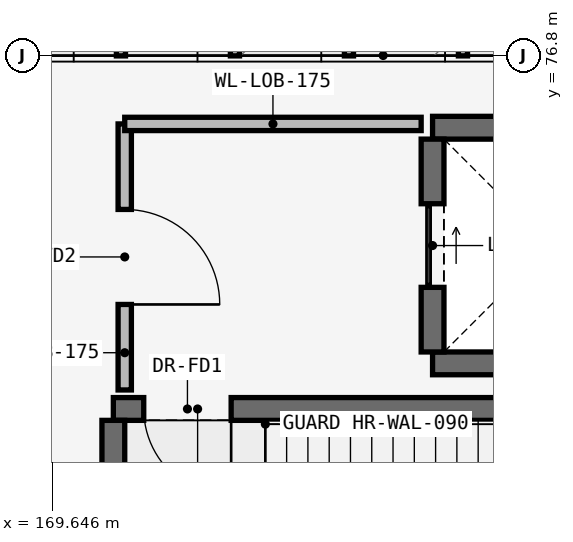
"""IFC4 building model, lengths in metres.
Left out: names, types, materials, properties, quantities, classifications, styles, units other than length and angle.
Written with IfcOpenShell. Run it as: python <this file> out.ifc"""

import sys

from ifc_helpers import new_model, si_unit, direction, frame, frame_2d, origin, place, context, subcontext, project, spatial, rectangle, extrude, element, fill, save


model = new_model("IFC4")
c1 = context("Model", 3, precision=1e-05, world=origin(), true_north=direction((0.0, 1.0)))
c2 = subcontext(c1, "Body", "Model", "MODEL_VIEW")
j1 = project(units=[si_unit("LENGTHUNIT", "METRE"), si_unit("PLANEANGLEUNIT", "RADIAN")], contexts=[c1])
p1 = place(None, origin())
s1 = spatial("IfcSite", under=j1, at=p1, CompositionType="ELEMENT")
p2 = place(p1, origin())
s2 = spatial("IfcBuilding", under=s1, at=p2, CompositionType="ELEMENT")
p3 = place(p2, frame((0.0, 0.0, 14.4)))
s3 = spatial("IfcBuildingStorey", under=s2, at=p3, CompositionType="ELEMENT", Elevation=14.4)
p4 = place(p3, frame((170.45, 72.15, 0.0), z_axis=(0.0, 0.0, 1.0), x_axis=(1.0, 0.0, 0.0)))
e1 = element("IfcWall", 1, at=p4, inside=s3, PredefinedType="SHEAR", context=c2, shape_type="SweptSolid", body=[
    extrude(rectangle(XDim=7.92, YDim=0.3, at=frame_2d((3.96, 0.0))), origin(), (0.0, 0.0, 1.0), 3.95),
])
p5 = place(p4, frame((0.4, 0.0, 0.0)))
e2 = element("IfcOpeningElement", 2, at=p5, cuts=e1, PredefinedType="OPENING", context=c2, shape_type="SweptSolid", body=[
    extrude(rectangle(XDim=1.15, YDim=2.15, at=frame_2d((0.575, 1.075))), frame((0.0, 0.165, 0.0), z_axis=(0.0, -1.0, 0.0), x_axis=(1.0, 0.0, 0.0)), (0.0, 0.0, 1.0), 0.33),
])
p6 = place(p3, frame((170.45, 68.1, 0.0), z_axis=(0.0, 0.0, 1.0), x_axis=(0.0, 1.0, 0.0)))
e3 = element("IfcWall", 3, at=p6, inside=s3, PredefinedType="SHEAR", context=c2, shape_type="SweptSolid", body=[
    extrude(rectangle(XDim=3.9, YDim=0.3, at=frame_2d((1.95, 0.0))), origin(), (0.0, 0.0, 1.0), 3.95),
])
for number, where, z_axis, x_axis in (
    (4, (174.65, 72.75, 0.0), (0.0, 0.0, 1.0), (1.0, 0.0, 0.0)),
    (5, (174.65, 75.85, 0.0), (0.0, 0.0, 1.0), (1.0, 0.0, 0.0)),
):
    element("IfcWall", number, at=place(p3, frame(where, z_axis=z_axis, x_axis=x_axis)), inside=s3, PredefinedType="SHEAR", context=c2, shape_type="SweptSolid", body=[
        extrude(rectangle(XDim=3.1, YDim=0.3, at=frame_2d((1.55, 0.0))), origin(), (0.0, 0.0, 1.0), 3.95),
    ])
p7 = place(p3, frame((174.65, 72.9, 0.0), z_axis=(0.0, 0.0, 1.0), x_axis=(0.0, 1.0, 0.0)))
e6 = element("IfcWall", 6, at=p7, inside=s3, PredefinedType="SHEAR", context=c2, shape_type="SweptSolid", body=[
    extrude(rectangle(XDim=2.8, YDim=0.3, at=frame_2d((1.4, 0.0))), origin(), (0.0, 0.0, 1.0), 3.95),
])
p8 = place(p7, frame((0.85, 0.0, 0.0)))
e7 = element("IfcOpeningElement", 7, at=p8, cuts=e6, PredefinedType="OPENING", context=c2, shape_type="SweptSolid", body=[
    extrude(rectangle(XDim=1.1, YDim=2.15, at=frame_2d((0.55, 1.075))), frame((0.0, 0.165, 0.0), z_axis=(0.0, -1.0, 0.0), x_axis=(1.0, 0.0, 0.0)), (0.0, 0.0, 1.0), 0.33),
])
p9 = place(p3, frame((170.6, 72.4, 0.0), z_axis=(0.0, 0.0, 1.0), x_axis=(0.0, 1.0, 0.0)))
e8 = element("IfcWall", 8, at=p9, inside=s3, PredefinedType="PARTITIONING", context=c2, shape_type="SweptSolid", body=[
    extrude(rectangle(XDim=3.5, YDim=0.175, at=frame_2d((1.75, 0.0))), origin(), (0.0, 0.0, 1.0), 3.95),
])
p10 = place(p9, frame((1.125, 0.0, 0.0)))
e9 = element("IfcOpeningElement", 9, at=p10, cuts=e8, PredefinedType="OPENING", context=c2, shape_type="SweptSolid", body=[
    extrude(rectangle(XDim=1.25, YDim=2.2, at=frame_2d((0.625, 1.1))), frame((0.0, 0.103, 0.0), z_axis=(0.0, -1.0, 0.0), x_axis=(1.0, 0.0, 0.0)), (0.0, 0.0, 1.0), 0.205),
])
p11 = place(p3, frame((170.6, 75.9, 0.0), z_axis=(0.0, 0.0, 1.0), x_axis=(1.0, 0.0, 0.0)))
e10 = element("IfcWall", 10, at=p11, inside=s3, PredefinedType="PARTITIONING", context=c2, shape_type="SweptSolid", body=[
    extrude(rectangle(XDim=3.9, YDim=0.175, at=frame_2d((1.95, 0.0))), origin(), (0.0, 0.0, 1.0), 3.95),
])
p12 = place(p5, frame((1.15, 0.0, 0.0), z_axis=(0.0, 0.0, 1.0), x_axis=(-1.0, 0.0, 0.0)))
e11 = element("IfcDoor", 11, at=p12, inside=s3, OperationType="SINGLE_SWING_RIGHT", PredefinedType="DOOR", context=c2, shape_type="SweptSolid", body=[
    extrude(rectangle(XDim=1.15, YDim=2.15, at=frame_2d((0.575, 1.075))), frame((0.0, 0.025, 0.0), z_axis=(0.0, -1.0, 0.0), x_axis=(1.0, 0.0, 0.0)), (0.0, 0.0, 1.0), 0.05),
])
fill(e2, e11)
p13 = place(p8, origin())
e12 = element("IfcDoor", 12, at=p13, inside=s3, OperationType="SLIDING_TO_LEFT", PredefinedType="DOOR", context=c2, shape_type="SweptSolid", body=[
    extrude(rectangle(XDim=1.1, YDim=2.15, at=frame_2d((0.55, 1.075))), frame((0.0, 0.025, 0.0), z_axis=(0.0, -1.0, 0.0), x_axis=(1.0, 0.0, 0.0)), (0.0, 0.0, 1.0), 0.05),
])
fill(e7, e12)
p14 = place(p10, frame((1.25, 0.0, 0.0), z_axis=(0.0, 0.0, 1.0), x_axis=(-1.0, 0.0, 0.0)))
e13 = element("IfcDoor", 13, at=p14, inside=s3, OperationType="SINGLE_SWING_LEFT", PredefinedType="DOOR", context=c2, shape_type="SweptSolid", body=[
    extrude(rectangle(XDim=1.25, YDim=2.2, at=frame_2d((0.625, 1.1))), frame((0.0, 0.025, 0.0), z_axis=(0.0, -1.0, 0.0), x_axis=(1.0, 0.0, 0.0)), (0.0, 0.0, 1.0), 0.05),
])
fill(e9, e13)
save(model, sys.argv[1])
